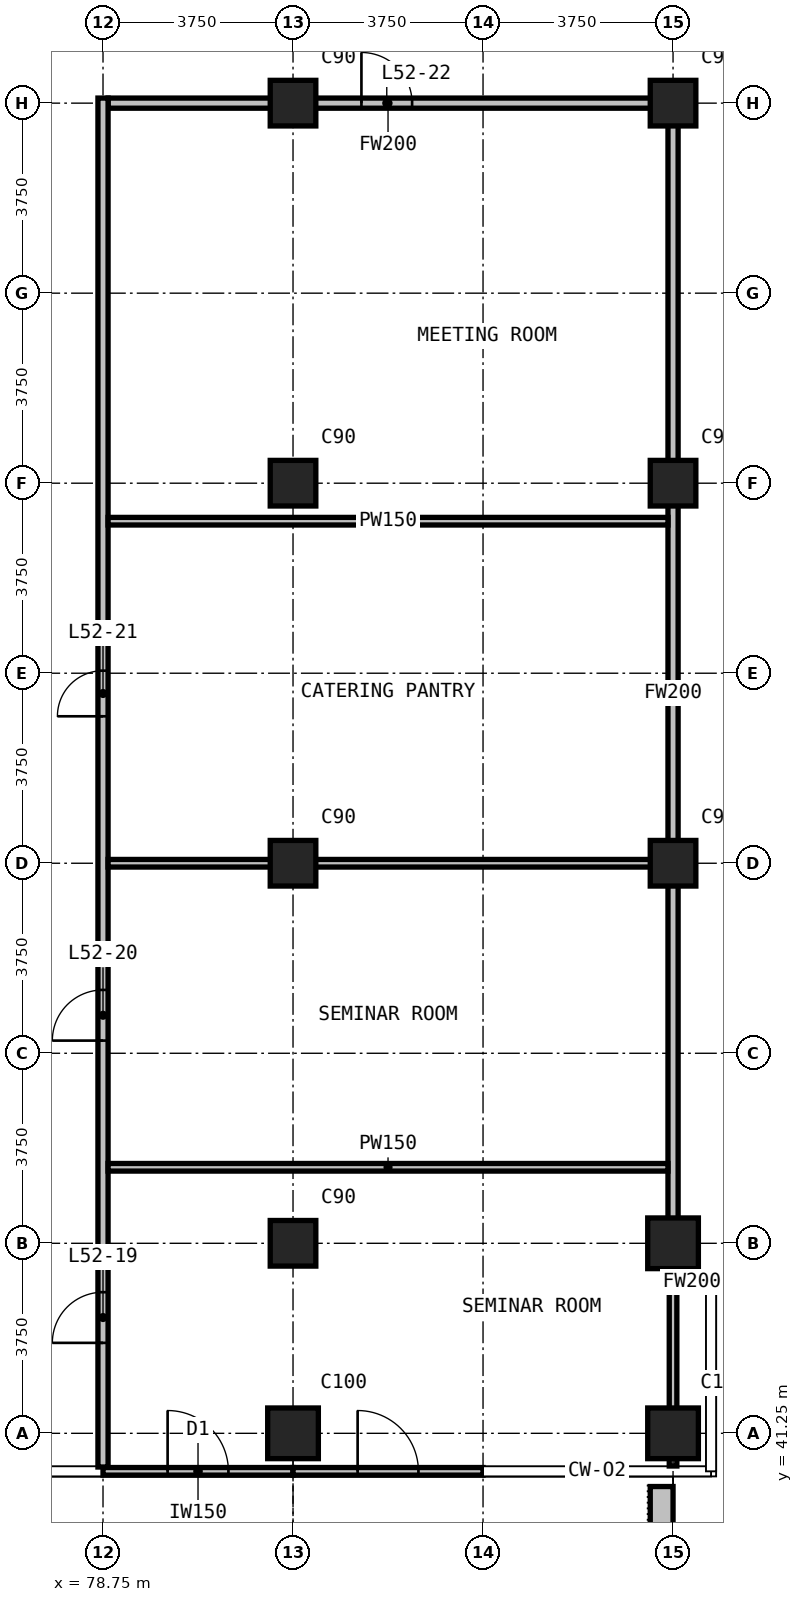
"""IFC4 building model, lengths in metres.
Left out: names, types, materials, properties, quantities, classifications, styles, units other than length and angle.
Written with IfcOpenShell. Run it as: python <this file> out.ifc"""

import sys

from ifc_helpers import new_model, si_unit, direction, frame, frame_2d, origin, origin_2d, place, context, subcontext, project, spatial, rectangle, extrude, element, fill, save


model = new_model("IFC4")
c1 = context("Model", 3, precision=1e-05, world=origin(), true_north=direction((0.0, 1.0)))
c2 = subcontext(c1, "Body", "Model", "MODEL_VIEW")
j1 = project(units=[si_unit("LENGTHUNIT", "METRE"), si_unit("PLANEANGLEUNIT", "RADIAN")], contexts=[c1])
p1 = place(None, origin())
s1 = spatial("IfcSite", under=j1, at=p1, CompositionType="ELEMENT")
p2 = place(p1, origin())
s2 = spatial("IfcBuilding", under=s1, at=p2, CompositionType="ELEMENT")
p3 = place(p2, frame((0.0, 0.0, 203.1)))
s3 = spatial("IfcBuildingStorey", under=s2, at=p3, CompositionType="ELEMENT", Elevation=203.1)
p4 = place(p3, frame((82.5, 41.25, 0.0), z_axis=(0.0, 0.0, 1.0), x_axis=(1.0, 0.0, 0.0)))
e1 = element("IfcColumn", 1, at=p4, inside=s3, PredefinedType="COLUMN", context=c2, shape_type="SweptSolid", body=[
    extrude(rectangle(XDim=1.0, YDim=1.0, at=origin_2d()), origin(), (0.0, 0.0, 1.0), 3.6),
])
for number, where, z_axis, x_axis in (
    (2, (82.5, 45.0, 0.0), (0.0, 0.0, 1.0), (1.0, 0.0, 0.0)),
    (3, (82.5, 52.5, 0.0), (0.0, 0.0, 1.0), (1.0, 0.0, 0.0)),
    (4, (82.5, 60.0, 0.0), (0.0, 0.0, 1.0), (1.0, 0.0, 0.0)),
    (5, (82.5, 67.5, 0.0), (0.0, 0.0, 1.0), (1.0, 0.0, 0.0)),
):
    element("IfcColumn", number, at=place(p3, frame(where, z_axis=z_axis, x_axis=x_axis)), inside=s3, PredefinedType="COLUMN", context=c2, shape_type="SweptSolid", body=[
        extrude(rectangle(XDim=0.9, YDim=0.9, at=origin_2d()), origin(), (0.0, 0.0, 1.0), 3.6),
    ])
for number, where, z_axis, x_axis in (
    (6, (90.0, 41.25, 0.0), (0.0, 0.0, 1.0), (1.0, 0.0, 0.0)),
    (7, (90.0, 45.0, 0.0), (0.0, 0.0, 1.0), (1.0, 0.0, 0.0)),
):
    element("IfcColumn", number, at=place(p3, frame(where, z_axis=z_axis, x_axis=x_axis)), inside=s3, PredefinedType="COLUMN", context=c2, shape_type="SweptSolid", body=[
        extrude(rectangle(XDim=1.0, YDim=1.0, at=origin_2d()), origin(), (0.0, 0.0, 1.0), 3.6),
    ])
for number, where, z_axis, x_axis in (
    (8, (90.0, 52.5, 0.0), (0.0, 0.0, 1.0), (1.0, 0.0, 0.0)),
    (9, (90.0, 60.0, 0.0), (0.0, 0.0, 1.0), (1.0, 0.0, 0.0)),
    (10, (90.0, 67.5, 0.0), (0.0, 0.0, 1.0), (1.0, 0.0, 0.0)),
):
    element("IfcColumn", number, at=place(p3, frame(where, z_axis=z_axis, x_axis=x_axis)), inside=s3, PredefinedType="COLUMN", context=c2, shape_type="SweptSolid", body=[
        extrude(rectangle(XDim=0.9, YDim=0.9, at=origin_2d()), origin(), (0.0, 0.0, 1.0), 3.6),
    ])
p5 = place(p3, frame((78.75, 40.5, 0.0), z_axis=(0.0, 0.0, 1.0), x_axis=(1.0, 0.0, 0.0)))
e11 = element("IfcWall", 11, at=p5, inside=s3, PredefinedType="SOLIDWALL", context=c2, shape_type="SweptSolid", body=[
    extrude(rectangle(XDim=3.75, YDim=0.15, at=frame_2d((1.875, 0.0))), origin(), (0.0, 0.0, 1.0), 3.3),
])
p6 = place(p5, frame((1.275, 0.0, 0.0)))
e12 = element("IfcOpeningElement", 12, at=p6, cuts=e11, PredefinedType="OPENING", context=c2, shape_type="SweptSolid", body=[
    extrude(rectangle(XDim=1.2, YDim=2.4, at=frame_2d((0.6, 1.2))), frame((0.0, 0.085, 0.0), z_axis=(0.0, -1.0, 0.0), x_axis=(1.0, 0.0, 0.0)), (0.0, 0.0, 1.0), 0.17),
])
p7 = place(p3, frame((82.5, 40.5, 0.0), z_axis=(0.0, 0.0, 1.0), x_axis=(1.0, 0.0, 0.0)))
e13 = element("IfcWall", 13, at=p7, inside=s3, PredefinedType="SOLIDWALL", context=c2, shape_type="SweptSolid", body=[
    extrude(rectangle(XDim=3.75, YDim=0.15, at=frame_2d((1.875, 0.0))), origin(), (0.0, 0.0, 1.0), 3.3),
])
p8 = place(p7, frame((1.275, 0.0, 0.0)))
e14 = element("IfcOpeningElement", 14, at=p8, cuts=e13, PredefinedType="OPENING", context=c2, shape_type="SweptSolid", body=[
    extrude(rectangle(XDim=1.2, YDim=2.4, at=frame_2d((0.6, 1.2))), frame((0.0, 0.085, 0.0), z_axis=(0.0, -1.0, 0.0), x_axis=(1.0, 0.0, 0.0)), (0.0, 0.0, 1.0), 0.17),
])
p9 = place(p3, frame((89.775, 40.2, 0.0), z_axis=(0.0, 0.0, 1.0), x_axis=(0.0, -1.0, 0.0)))
e15 = element("IfcWall", 15, at=p9, inside=s3, PredefinedType="USERDEFINED", context=c2, shape_type="SweptSolid", body=[
    extrude(rectangle(XDim=2.35, YDim=0.45, at=frame_2d((1.175, 0.0))), origin(), (0.0, 0.0, 1.0), 1.1),
])
p10 = place(p3, frame((90.1, 44.235, 0.0), z_axis=(0.0, 0.0, 1.0), x_axis=(1.0, 0.0, 0.0)))
e16 = element("IfcWall", 16, at=p10, inside=s3, PredefinedType="PARTITIONING", context=c2, shape_type="SweptSolid", body=[
    extrude(rectangle(XDim=0.545, YDim=0.2, at=frame_2d((0.272, 0.0))), origin(), (0.0, 0.0, 1.0), 3.3),
])
p11 = place(p3, frame((78.85, 67.5, 0.0), z_axis=(0.0, 0.0, 1.0), x_axis=(1.0, 0.0, 0.0)))
e17 = element("IfcWall", 17, at=p11, inside=s3, PredefinedType="PARTITIONING", context=c2, shape_type="SweptSolid", body=[
    extrude(rectangle(XDim=11.05, YDim=0.2, at=frame_2d((5.525, 0.0))), origin(), (0.0, 0.0, 1.0), 3.3),
])
p12 = place(p11, frame((5.0, 0.0, 0.0)))
e18 = element("IfcOpeningElement", 18, at=p12, cuts=e17, PredefinedType="OPENING", context=c2, shape_type="SweptSolid", body=[
    extrude(rectangle(XDim=1.0, YDim=2.2, at=frame_2d((0.5, 1.1))), frame((0.0, 0.11, 0.0), z_axis=(0.0, -1.0, 0.0), x_axis=(1.0, 0.0, 0.0)), (0.0, 0.0, 1.0), 0.22),
])
p13 = place(p3, frame((78.75, 40.585, 0.0), z_axis=(0.0, 0.0, 1.0), x_axis=(0.0, 1.0, 0.0)))
e19 = element("IfcWall", 19, at=p13, inside=s3, PredefinedType="PARTITIONING", context=c2, shape_type="SweptSolid", body=[
    extrude(rectangle(XDim=27.015, YDim=0.2, at=frame_2d((13.508, 0.0))), origin(), (0.0, 0.0, 1.0), 3.3),
])
p14 = place(p13, frame((2.45, 0.0, 0.0)))
e20 = element("IfcOpeningElement", 20, at=p14, cuts=e19, PredefinedType="OPENING", context=c2, shape_type="SweptSolid", body=[
    extrude(rectangle(XDim=1.0, YDim=2.2, at=frame_2d((0.5, 1.1))), frame((0.0, 0.11, 0.0), z_axis=(0.0, -1.0, 0.0), x_axis=(1.0, 0.0, 0.0)), (0.0, 0.0, 1.0), 0.22),
])
p15 = place(p13, frame((8.415, 0.0, 0.0)))
e21 = element("IfcOpeningElement", 21, at=p15, cuts=e19, PredefinedType="OPENING", context=c2, shape_type="SweptSolid", body=[
    extrude(rectangle(XDim=1.0, YDim=2.2, at=frame_2d((0.5, 1.1))), frame((0.0, 0.11, 0.0), z_axis=(0.0, -1.0, 0.0), x_axis=(1.0, 0.0, 0.0)), (0.0, 0.0, 1.0), 0.22),
])
p16 = place(p13, frame((14.815, 0.0, 0.0)))
e22 = element("IfcOpeningElement", 22, at=p16, cuts=e19, PredefinedType="OPENING", context=c2, shape_type="SweptSolid", body=[
    extrude(rectangle(XDim=0.9, YDim=2.2, at=frame_2d((0.45, 1.1))), frame((0.0, 0.11, 0.0), z_axis=(0.0, -1.0, 0.0), x_axis=(1.0, 0.0, 0.0)), (0.0, 0.0, 1.0), 0.22),
])
p17 = place(p3, frame((90.0, 44.135, 0.0), z_axis=(0.0, 0.0, 1.0), x_axis=(0.0, 1.0, 0.0)))
e23 = element("IfcWall", 23, at=p17, inside=s3, PredefinedType="PARTITIONING", context=c2, shape_type="SweptSolid", body=[
    extrude(rectangle(XDim=23.465, YDim=0.2, at=frame_2d((11.732, 0.0))), origin(), (0.0, 0.0, 1.0), 3.3),
])
for number, where, z_axis, x_axis in (
    (24, (78.85, 46.5, 0.0), (0.0, 0.0, 1.0), (1.0, 0.0, 0.0)),
    (25, (78.85, 52.5, 0.0), (0.0, 0.0, 1.0), (1.0, 0.0, 0.0)),
    (26, (78.85, 59.25, 0.0), (0.0, 0.0, 1.0), (1.0, 0.0, 0.0)),
):
    element("IfcWall", number, at=place(p3, frame(where, z_axis=z_axis, x_axis=x_axis)), inside=s3, PredefinedType="PARTITIONING", context=c2, shape_type="SweptSolid", body=[
        extrude(rectangle(XDim=11.05, YDim=0.15, at=frame_2d((5.525, 0.0))), origin(), (0.0, 0.0, 1.0), 3.3),
    ])
p18 = place(p3, frame((90.0, 40.605, 0.0), z_axis=(0.0, 0.0, 1.0), x_axis=(0.0, 1.0, 0.0)))
e27 = element("IfcWall", 27, at=p18, inside=s3, PredefinedType="PARTITIONING", context=c2, shape_type="SweptSolid", body=[
    extrude(rectangle(XDim=3.6, YDim=0.15, at=frame_2d((1.8, 0.0))), origin(), (0.0, 0.0, 1.0), 3.3),
])
p19 = place(p6, origin())
e28 = element("IfcDoor", 28, at=p19, inside=s3, OperationType="SINGLE_SWING_LEFT", PredefinedType="DOOR", context=c2, shape_type="SweptSolid", body=[
    extrude(rectangle(XDim=1.2, YDim=2.4, at=frame_2d((0.6, 1.2))), frame((0.0, 0.025, 0.0), z_axis=(0.0, -1.0, 0.0), x_axis=(1.0, 0.0, 0.0)), (0.0, 0.0, 1.0), 0.05),
])
fill(e12, e28)
p20 = place(p8, origin())
e29 = element("IfcDoor", 29, at=p20, inside=s3, OperationType="SINGLE_SWING_LEFT", PredefinedType="DOOR", context=c2, shape_type="SweptSolid", body=[
    extrude(rectangle(XDim=1.2, YDim=2.4, at=frame_2d((0.6, 1.2))), frame((0.0, 0.025, 0.0), z_axis=(0.0, -1.0, 0.0), x_axis=(1.0, 0.0, 0.0)), (0.0, 0.0, 1.0), 0.05),
])
fill(e14, e29)
p21 = place(p14, origin())
e30 = element("IfcDoor", 30, at=p21, inside=s3, OperationType="SINGLE_SWING_LEFT", PredefinedType="DOOR", context=c2, shape_type="SweptSolid", body=[
    extrude(rectangle(XDim=1.0, YDim=2.2, at=frame_2d((0.5, 1.1))), frame((0.0, 0.025, 0.0), z_axis=(0.0, -1.0, 0.0), x_axis=(1.0, 0.0, 0.0)), (0.0, 0.0, 1.0), 0.05),
])
fill(e20, e30)
p22 = place(p15, origin())
e31 = element("IfcDoor", 31, at=p22, inside=s3, OperationType="SINGLE_SWING_RIGHT", PredefinedType="DOOR", context=c2, shape_type="SweptSolid", body=[
    extrude(rectangle(XDim=1.0, YDim=2.2, at=frame_2d((0.5, 1.1))), frame((0.0, 0.025, 0.0), z_axis=(0.0, -1.0, 0.0), x_axis=(1.0, 0.0, 0.0)), (0.0, 0.0, 1.0), 0.05),
])
fill(e21, e31)
p23 = place(p16, origin())
e32 = element("IfcDoor", 32, at=p23, inside=s3, OperationType="SINGLE_SWING_LEFT", PredefinedType="DOOR", context=c2, shape_type="SweptSolid", body=[
    extrude(rectangle(XDim=0.9, YDim=2.2, at=frame_2d((0.45, 1.1))), frame((0.0, 0.025, 0.0), z_axis=(0.0, -1.0, 0.0), x_axis=(1.0, 0.0, 0.0)), (0.0, 0.0, 1.0), 0.05),
])
fill(e22, e32)
p24 = place(p12, origin())
e33 = element("IfcDoor", 33, at=p24, inside=s3, OperationType="SINGLE_SWING_LEFT", PredefinedType="DOOR", context=c2, shape_type="SweptSolid", body=[
    extrude(rectangle(XDim=1.0, YDim=2.2, at=frame_2d((0.5, 1.1))), frame((0.0, 0.025, 0.0), z_axis=(0.0, -1.0, 0.0), x_axis=(1.0, 0.0, 0.0)), (0.0, 0.0, 1.0), 0.05),
])
fill(e18, e33)
save(model, sys.argv[1])
